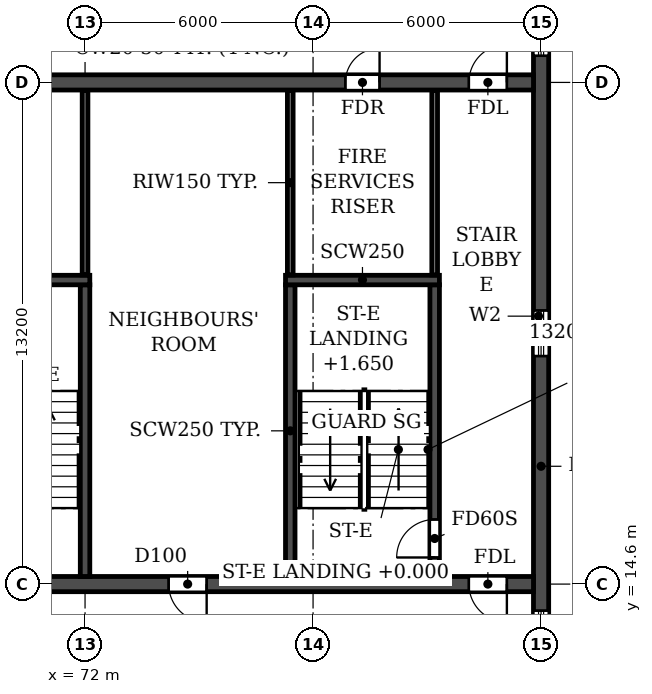
"""IFC4 building model, lengths in metres.
Left out: names, types, materials, properties, quantities, classifications, styles, units other than length and angle.
Written with IfcOpenShell. Run it as: python <this file> out.ifc"""

import sys

from ifc_helpers import new_model, si_unit, direction, frame, frame_2d, origin, place, context, subcontext, project, spatial, rectangle, extrude, element, fill, save


model = new_model("IFC4")
c1 = context("Model", 3, precision=1e-05, world=origin(), true_north=direction((0.0, 1.0)))
c2 = subcontext(c1, "Body", "Model", "MODEL_VIEW")
j1 = project(units=[si_unit("LENGTHUNIT", "METRE"), si_unit("PLANEANGLEUNIT", "RADIAN")], contexts=[c1])
p1 = place(None, origin())
s1 = spatial("IfcSite", under=j1, at=p1, CompositionType="ELEMENT")
p2 = place(p1, origin())
s2 = spatial("IfcBuilding", under=s1, at=p2, CompositionType="ELEMENT")
p3 = place(p2, frame((0.0, 0.0, 208.2)))
s3 = spatial("IfcBuildingStorey", under=s2, at=p3, CompositionType="ELEMENT", Elevation=208.2)
p4 = place(p3, frame((84.0, 4.683, 0.0), z_axis=(0.0, 0.0, 1.0), x_axis=(0.0, 1.0, 0.0)))
e1 = element("IfcWall", 1, at=p4, inside=s3, PredefinedType="SHEAR", context=c2, shape_type="SweptSolid", body=[
    extrude(rectangle(XDim=31.834, YDim=0.4, at=frame_2d((15.917, 0.0))), origin(), (0.0, 0.0, 1.0), 3.0),
])
p5 = place(p4, frame((23.817, 0.0, 0.9)))
e2 = element("IfcOpeningElement", 2, at=p5, cuts=e1, PredefinedType="OPENING", context=c2, shape_type="SweptSolid", body=[
    extrude(rectangle(XDim=1.2, YDim=1.5, at=frame_2d((0.6, 0.75))), frame((0.0, 0.21, 0.0), z_axis=(0.0, -1.0, 0.0), x_axis=(1.0, 0.0, 0.0)), (0.0, 0.0, 1.0), 0.42),
])
p6 = place(p4, frame((8.017, 0.0, 0.9)))
e3 = element("IfcOpeningElement", 3, at=p6, cuts=e1, PredefinedType="OPENING", context=c2, shape_type="SweptSolid", body=[
    extrude(rectangle(XDim=1.2, YDim=1.5, at=frame_2d((0.6, 0.75))), frame((0.0, 0.21, 0.0), z_axis=(0.0, -1.0, 0.0), x_axis=(1.0, 0.0, 0.0)), (0.0, 0.0, 1.0), 0.42),
])
p7 = place(p4, frame((27.694, 0.0, 0.6)))
e4 = element("IfcOpeningElement", 4, at=p7, cuts=e1, PredefinedType="OPENING", context=c2, shape_type="SweptSolid", body=[
    extrude(rectangle(XDim=2.2, YDim=1.8, at=frame_2d((1.1, 0.9))), frame((0.0, 0.21, 0.0), z_axis=(0.0, -1.0, 0.0), x_axis=(1.0, 0.0, 0.0)), (0.0, 0.0, 1.0), 0.42),
])
p8 = place(p4, frame((2.541, 0.0, 0.6)))
e5 = element("IfcOpeningElement", 5, at=p8, cuts=e1, PredefinedType="OPENING", context=c2, shape_type="SweptSolid", body=[
    extrude(rectangle(XDim=2.2, YDim=1.8, at=frame_2d((1.1, 0.9))), frame((0.0, 0.21, 0.0), z_axis=(0.0, -1.0, 0.0), x_axis=(1.0, 0.0, 0.0)), (0.0, 0.0, 1.0), 0.42),
])
p9 = place(p4, frame((15.917, 0.0, 0.9)))
e6 = element("IfcOpeningElement", 6, at=p9, cuts=e1, PredefinedType="OPENING", context=c2, shape_type="SweptSolid", body=[
    extrude(rectangle(XDim=1.2, YDim=1.5, at=frame_2d((0.6, 0.75))), frame((0.0, 0.21, 0.0), z_axis=(0.0, -1.0, 0.0), x_axis=(1.0, 0.0, 0.0)), (0.0, 0.0, 1.0), 0.42),
])
p10 = place(p3, frame((18.2, 14.6, 0.0), z_axis=(0.0, 0.0, 1.0), x_axis=(1.0, 0.0, 0.0)))
e7 = element("IfcWall", 7, at=p10, inside=s3, PredefinedType="SOLIDWALL", context=c2, shape_type="SweptSolid", body=[
    extrude(rectangle(XDim=65.6, YDim=0.4, at=frame_2d((32.8, 0.0))), origin(), (0.0, 0.0, 1.0), 3.0),
])
p11 = place(p10, frame((0.7, 0.0, 0.0)))
e8 = element("IfcOpeningElement", 8, at=p11, cuts=e7, PredefinedType="OPENING", context=c2, shape_type="SweptSolid", body=[
    extrude(rectangle(XDim=1.0, YDim=2.1, at=frame_2d((0.5, 1.05))), frame((0.0, 0.21, 0.0), z_axis=(0.0, -1.0, 0.0), x_axis=(1.0, 0.0, 0.0)), (0.0, 0.0, 1.0), 0.42),
])
p12 = place(p10, frame((8.6, 0.0, 0.0)))
e9 = element("IfcOpeningElement", 9, at=p12, cuts=e7, PredefinedType="OPENING", context=c2, shape_type="SweptSolid", body=[
    extrude(rectangle(XDim=1.0, YDim=2.1, at=frame_2d((0.5, 1.05))), frame((0.0, 0.21, 0.0), z_axis=(0.0, -1.0, 0.0), x_axis=(1.0, 0.0, 0.0)), (0.0, 0.0, 1.0), 0.42),
])
p13 = place(p10, frame((13.2, 0.0, 0.0)))
e10 = element("IfcOpeningElement", 10, at=p13, cuts=e7, PredefinedType="OPENING", context=c2, shape_type="SweptSolid", body=[
    extrude(rectangle(XDim=1.0, YDim=2.1, at=frame_2d((0.5, 1.05))), frame((0.0, 0.21, 0.0), z_axis=(0.0, -1.0, 0.0), x_axis=(1.0, 0.0, 0.0)), (0.0, 0.0, 1.0), 0.42),
])
p14 = place(p10, frame((27.1, 0.0, 0.0)))
e11 = element("IfcOpeningElement", 11, at=p14, cuts=e7, PredefinedType="OPENING", context=c2, shape_type="SweptSolid", body=[
    extrude(rectangle(XDim=1.0, YDim=2.1, at=frame_2d((0.5, 1.05))), frame((0.0, 0.21, 0.0), z_axis=(0.0, -1.0, 0.0), x_axis=(1.0, 0.0, 0.0)), (0.0, 0.0, 1.0), 0.42),
])
p15 = place(p10, frame((32.3, 0.0, 0.0)))
e12 = element("IfcOpeningElement", 12, at=p15, cuts=e7, PredefinedType="OPENING", context=c2, shape_type="SweptSolid", body=[
    extrude(rectangle(XDim=1.0, YDim=2.1, at=frame_2d((0.5, 1.05))), frame((0.0, 0.21, 0.0), z_axis=(0.0, -1.0, 0.0), x_axis=(1.0, 0.0, 0.0)), (0.0, 0.0, 1.0), 0.42),
])
p16 = place(p10, frame((34.9, 0.0, 0.0)))
e13 = element("IfcOpeningElement", 13, at=p16, cuts=e7, PredefinedType="OPENING", context=c2, shape_type="SweptSolid", body=[
    extrude(rectangle(XDim=1.0, YDim=2.1, at=frame_2d((0.5, 1.05))), frame((0.0, 0.21, 0.0), z_axis=(0.0, -1.0, 0.0), x_axis=(1.0, 0.0, 0.0)), (0.0, 0.0, 1.0), 0.42),
])
p17 = place(p10, frame((38.8, 0.0, 0.0)))
e14 = element("IfcOpeningElement", 14, at=p17, cuts=e7, PredefinedType="OPENING", context=c2, shape_type="SweptSolid", body=[
    extrude(rectangle(XDim=1.0, YDim=2.1, at=frame_2d((0.5, 1.05))), frame((0.0, 0.21, 0.0), z_axis=(0.0, -1.0, 0.0), x_axis=(1.0, 0.0, 0.0)), (0.0, 0.0, 1.0), 0.42),
])
p18 = place(p10, frame((51.4, 0.0, 0.0)))
e15 = element("IfcOpeningElement", 15, at=p18, cuts=e7, PredefinedType="OPENING", context=c2, shape_type="SweptSolid", body=[
    extrude(rectangle(XDim=1.0, YDim=2.1, at=frame_2d((0.5, 1.05))), frame((0.0, 0.21, 0.0), z_axis=(0.0, -1.0, 0.0), x_axis=(1.0, 0.0, 0.0)), (0.0, 0.0, 1.0), 0.42),
])
p19 = place(p10, frame((56.0, 0.0, 0.0)))
e16 = element("IfcOpeningElement", 16, at=p19, cuts=e7, PredefinedType="OPENING", context=c2, shape_type="SweptSolid", body=[
    extrude(rectangle(XDim=1.0, YDim=2.1, at=frame_2d((0.5, 1.05))), frame((0.0, 0.21, 0.0), z_axis=(0.0, -1.0, 0.0), x_axis=(1.0, 0.0, 0.0)), (0.0, 0.0, 1.0), 0.42),
])
p20 = place(p10, frame((63.9, 0.0, 0.0)))
e17 = element("IfcOpeningElement", 17, at=p20, cuts=e7, PredefinedType="OPENING", context=c2, shape_type="SweptSolid", body=[
    extrude(rectangle(XDim=1.0, YDim=2.1, at=frame_2d((0.5, 1.05))), frame((0.0, 0.21, 0.0), z_axis=(0.0, -1.0, 0.0), x_axis=(1.0, 0.0, 0.0)), (0.0, 0.0, 1.0), 0.42),
])
p21 = place(p3, frame((18.2, 27.8, 0.0), z_axis=(0.0, 0.0, 1.0), x_axis=(1.0, 0.0, 0.0)))
e18 = element("IfcWall", 18, at=p21, inside=s3, PredefinedType="SOLIDWALL", context=c2, shape_type="SweptSolid", body=[
    extrude(rectangle(XDim=65.6, YDim=0.4, at=frame_2d((32.8, 0.0))), origin(), (0.0, 0.0, 1.0), 3.0),
])
p22 = place(p21, frame((0.7, 0.0, 0.0)))
e19 = element("IfcOpeningElement", 19, at=p22, cuts=e18, PredefinedType="OPENING", context=c2, shape_type="SweptSolid", body=[
    extrude(rectangle(XDim=1.0, YDim=2.1, at=frame_2d((0.5, 1.05))), frame((0.0, 0.21, 0.0), z_axis=(0.0, -1.0, 0.0), x_axis=(1.0, 0.0, 0.0)), (0.0, 0.0, 1.0), 0.42),
])
p23 = place(p21, frame((4.05, 0.0, 0.0)))
e20 = element("IfcOpeningElement", 20, at=p23, cuts=e18, PredefinedType="OPENING", context=c2, shape_type="SweptSolid", body=[
    extrude(rectangle(XDim=0.9, YDim=2.1, at=frame_2d((0.45, 1.05))), frame((0.0, 0.21, 0.0), z_axis=(0.0, -1.0, 0.0), x_axis=(1.0, 0.0, 0.0)), (0.0, 0.0, 1.0), 0.42),
])
p24 = place(p21, frame((13.25, 0.0, 0.0)))
e21 = element("IfcOpeningElement", 21, at=p24, cuts=e18, PredefinedType="OPENING", context=c2, shape_type="SweptSolid", body=[
    extrude(rectangle(XDim=0.9, YDim=2.1, at=frame_2d((0.45, 1.05))), frame((0.0, 0.21, 0.0), z_axis=(0.0, -1.0, 0.0), x_axis=(1.0, 0.0, 0.0)), (0.0, 0.0, 1.0), 0.42),
])
p25 = place(p21, frame((17.7, 0.0, 0.0)))
e22 = element("IfcOpeningElement", 22, at=p25, cuts=e18, PredefinedType="OPENING", context=c2, shape_type="SweptSolid", body=[
    extrude(rectangle(XDim=1.0, YDim=2.1, at=frame_2d((0.5, 1.05))), frame((0.0, 0.21, 0.0), z_axis=(0.0, -1.0, 0.0), x_axis=(1.0, 0.0, 0.0)), (0.0, 0.0, 1.0), 0.42),
])
p26 = place(p21, frame((22.9, 0.0, 0.0)))
e23 = element("IfcOpeningElement", 23, at=p26, cuts=e18, PredefinedType="OPENING", context=c2, shape_type="SweptSolid", body=[
    extrude(rectangle(XDim=1.0, YDim=2.1, at=frame_2d((0.5, 1.05))), frame((0.0, 0.21, 0.0), z_axis=(0.0, -1.0, 0.0), x_axis=(1.0, 0.0, 0.0)), (0.0, 0.0, 1.0), 0.42),
])
p27 = place(p21, frame((29.4, 0.0, 0.0)))
e24 = element("IfcOpeningElement", 24, at=p27, cuts=e18, PredefinedType="OPENING", context=c2, shape_type="SweptSolid", body=[
    extrude(rectangle(XDim=1.0, YDim=2.1, at=frame_2d((0.5, 1.05))), frame((0.0, 0.21, 0.0), z_axis=(0.0, -1.0, 0.0), x_axis=(1.0, 0.0, 0.0)), (0.0, 0.0, 1.0), 0.42),
])
p28 = place(p21, frame((32.3, 0.0, 0.0)))
e25 = element("IfcOpeningElement", 25, at=p28, cuts=e18, PredefinedType="OPENING", context=c2, shape_type="SweptSolid", body=[
    extrude(rectangle(XDim=1.0, YDim=2.1, at=frame_2d((0.5, 1.05))), frame((0.0, 0.21, 0.0), z_axis=(0.0, -1.0, 0.0), x_axis=(1.0, 0.0, 0.0)), (0.0, 0.0, 1.0), 0.42),
])
p29 = place(p21, frame((35.2, 0.0, 0.0)))
e26 = element("IfcOpeningElement", 26, at=p29, cuts=e18, PredefinedType="OPENING", context=c2, shape_type="SweptSolid", body=[
    extrude(rectangle(XDim=1.0, YDim=2.1, at=frame_2d((0.5, 1.05))), frame((0.0, 0.21, 0.0), z_axis=(0.0, -1.0, 0.0), x_axis=(1.0, 0.0, 0.0)), (0.0, 0.0, 1.0), 0.42),
])
p30 = place(p21, frame((37.8, 0.0, 0.0)))
e27 = element("IfcOpeningElement", 27, at=p30, cuts=e18, PredefinedType="OPENING", context=c2, shape_type="SweptSolid", body=[
    extrude(rectangle(XDim=1.0, YDim=2.1, at=frame_2d((0.5, 1.05))), frame((0.0, 0.21, 0.0), z_axis=(0.0, -1.0, 0.0), x_axis=(1.0, 0.0, 0.0)), (0.0, 0.0, 1.0), 0.42),
])
p31 = place(p21, frame((40.4, 0.0, 0.0)))
e28 = element("IfcOpeningElement", 28, at=p31, cuts=e18, PredefinedType="OPENING", context=c2, shape_type="SweptSolid", body=[
    extrude(rectangle(XDim=1.0, YDim=2.1, at=frame_2d((0.5, 1.05))), frame((0.0, 0.21, 0.0), z_axis=(0.0, -1.0, 0.0), x_axis=(1.0, 0.0, 0.0)), (0.0, 0.0, 1.0), 0.42),
])
p32 = place(p21, frame((43.0, 0.0, 0.0)))
e29 = element("IfcOpeningElement", 29, at=p32, cuts=e18, PredefinedType="OPENING", context=c2, shape_type="SweptSolid", body=[
    extrude(rectangle(XDim=1.0, YDim=2.1, at=frame_2d((0.5, 1.05))), frame((0.0, 0.21, 0.0), z_axis=(0.0, -1.0, 0.0), x_axis=(1.0, 0.0, 0.0)), (0.0, 0.0, 1.0), 0.42),
])
p33 = place(p21, frame((46.9, 0.0, 0.0)))
e30 = element("IfcOpeningElement", 30, at=p33, cuts=e18, PredefinedType="OPENING", context=c2, shape_type="SweptSolid", body=[
    extrude(rectangle(XDim=1.0, YDim=2.1, at=frame_2d((0.5, 1.05))), frame((0.0, 0.21, 0.0), z_axis=(0.0, -1.0, 0.0), x_axis=(1.0, 0.0, 0.0)), (0.0, 0.0, 1.0), 0.42),
])
p34 = place(p21, frame((51.45, 0.0, 0.0)))
e31 = element("IfcOpeningElement", 31, at=p34, cuts=e18, PredefinedType="OPENING", context=c2, shape_type="SweptSolid", body=[
    extrude(rectangle(XDim=0.9, YDim=2.1, at=frame_2d((0.45, 1.05))), frame((0.0, 0.21, 0.0), z_axis=(0.0, -1.0, 0.0), x_axis=(1.0, 0.0, 0.0)), (0.0, 0.0, 1.0), 0.42),
])
p35 = place(p21, frame((60.65, 0.0, 0.0)))
e32 = element("IfcOpeningElement", 32, at=p35, cuts=e18, PredefinedType="OPENING", context=c2, shape_type="SweptSolid", body=[
    extrude(rectangle(XDim=0.9, YDim=2.1, at=frame_2d((0.45, 1.05))), frame((0.0, 0.21, 0.0), z_axis=(0.0, -1.0, 0.0), x_axis=(1.0, 0.0, 0.0)), (0.0, 0.0, 1.0), 0.42),
])
p36 = place(p21, frame((63.9, 0.0, 0.0)))
e33 = element("IfcOpeningElement", 33, at=p36, cuts=e18, PredefinedType="OPENING", context=c2, shape_type="SweptSolid", body=[
    extrude(rectangle(XDim=1.0, YDim=2.1, at=frame_2d((0.5, 1.05))), frame((0.0, 0.21, 0.0), z_axis=(0.0, -1.0, 0.0), x_axis=(1.0, 0.0, 0.0)), (0.0, 0.0, 1.0), 0.42),
])
p37 = place(p3, frame((72.0, 14.8, 0.0), z_axis=(0.0, 0.0, 1.0), x_axis=(0.0, 1.0, 0.0)))
e34 = element("IfcWall", 34, at=p37, inside=s3, PredefinedType="SOLIDWALL", context=c2, shape_type="SweptSolid", body=[
    extrude(rectangle(XDim=7.675, YDim=0.25, at=frame_2d((3.837, 0.0))), origin(), (0.0, 0.0, 1.0), 3.0),
])
p38 = place(p3, frame((68.075, 22.6, 0.0), z_axis=(0.0, 0.0, 1.0), x_axis=(1.0, 0.0, 0.0)))
e35 = element("IfcWall", 35, at=p38, inside=s3, PredefinedType="SOLIDWALL", context=c2, shape_type="SweptSolid", body=[
    extrude(rectangle(XDim=4.05, YDim=0.25, at=frame_2d((2.025, 0.0))), origin(), (0.0, 0.0, 1.0), 3.0),
])
p39 = place(p3, frame((77.4, 14.8, 0.0), z_axis=(0.0, 0.0, 1.0), x_axis=(0.0, 1.0, 0.0)))
e36 = element("IfcWall", 36, at=p39, inside=s3, PredefinedType="SOLIDWALL", context=c2, shape_type="SweptSolid", body=[
    extrude(rectangle(XDim=7.675, YDim=0.25, at=frame_2d((3.837, 0.0))), origin(), (0.0, 0.0, 1.0), 3.0),
])
p40 = place(p3, frame((81.2, 14.8, 0.0), z_axis=(0.0, 0.0, 1.0), x_axis=(0.0, 1.0, 0.0)))
e37 = element("IfcWall", 37, at=p40, inside=s3, PredefinedType="SOLIDWALL", context=c2, shape_type="SweptSolid", body=[
    extrude(rectangle(XDim=7.675, YDim=0.25, at=frame_2d((3.837, 0.0))), origin(), (0.0, 0.0, 1.0), 3.0),
])
p41 = place(p40, frame((0.5, 0.0, 0.0)))
e38 = element("IfcOpeningElement", 38, at=p41, cuts=e37, PredefinedType="OPENING", context=c2, shape_type="SweptSolid", body=[
    extrude(rectangle(XDim=1.0, YDim=2.1, at=frame_2d((0.5, 1.05))), frame((0.0, 0.135, 0.0), z_axis=(0.0, -1.0, 0.0), x_axis=(1.0, 0.0, 0.0)), (0.0, 0.0, 1.0), 0.27),
])
p42 = place(p3, frame((77.275, 22.6, 0.0), z_axis=(0.0, 0.0, 1.0), x_axis=(1.0, 0.0, 0.0)))
e39 = element("IfcWall", 39, at=p42, inside=s3, PredefinedType="SOLIDWALL", context=c2, shape_type="SweptSolid", body=[
    extrude(rectangle(XDim=4.05, YDim=0.25, at=frame_2d((2.025, 0.0))), origin(), (0.0, 0.0, 1.0), 3.0),
])
for number, where, z_axis, x_axis in (
    (40, (72.0, 22.735, 0.0), (0.0, 0.0, 1.0), (0.0, 1.0, 0.0)),
    (41, (77.4, 22.735, 0.0), (0.0, 0.0, 1.0), (0.0, 1.0, 0.0)),
    (42, (81.2, 22.735, 0.0), (0.0, 0.0, 1.0), (0.0, 1.0, 0.0)),
):
    element("IfcWall", number, at=place(p3, frame(where, z_axis=z_axis, x_axis=x_axis)), inside=s3, PredefinedType="PARTITIONING", context=c2, shape_type="SweptSolid", body=[
        extrude(rectangle(XDim=4.855, YDim=0.15, at=frame_2d((2.427, 0.0))), origin(), (0.0, 0.0, 1.0), 3.0),
    ])
p43 = place(p5, origin())
e43 = element("IfcWindow", 43, at=p43, inside=s3, PartitioningType="SINGLE_PANEL", PredefinedType="WINDOW", context=c2, shape_type="SweptSolid", body=[
    extrude(rectangle(XDim=1.2, YDim=1.5, at=frame_2d((0.6, 0.75))), frame((0.0, 0.03, 0.0), z_axis=(0.0, -1.0, 0.0), x_axis=(1.0, 0.0, 0.0)), (0.0, 0.0, 1.0), 0.06),
])
fill(e2, e43)
p44 = place(p6, origin())
e44 = element("IfcWindow", 44, at=p44, inside=s3, PartitioningType="SINGLE_PANEL", PredefinedType="WINDOW", context=c2, shape_type="SweptSolid", body=[
    extrude(rectangle(XDim=1.2, YDim=1.5, at=frame_2d((0.6, 0.75))), frame((0.0, 0.03, 0.0), z_axis=(0.0, -1.0, 0.0), x_axis=(1.0, 0.0, 0.0)), (0.0, 0.0, 1.0), 0.06),
])
fill(e3, e44)
p45 = place(p9, origin())
e45 = element("IfcWindow", 45, at=p45, inside=s3, PartitioningType="SINGLE_PANEL", PredefinedType="WINDOW", context=c2, shape_type="SweptSolid", body=[
    extrude(rectangle(XDim=1.2, YDim=1.5, at=frame_2d((0.6, 0.75))), frame((0.0, 0.03, 0.0), z_axis=(0.0, -1.0, 0.0), x_axis=(1.0, 0.0, 0.0)), (0.0, 0.0, 1.0), 0.06),
])
fill(e6, e45)
p46 = place(p35, origin())
e46 = element("IfcDoor", 46, at=p46, inside=s3, OperationType="SINGLE_SWING_RIGHT", PredefinedType="DOOR", context=c2, shape_type="SweptSolid", body=[
    extrude(rectangle(XDim=0.9, YDim=2.1, at=frame_2d((0.45, 1.05))), frame((0.0, 0.025, 0.0), z_axis=(0.0, -1.0, 0.0), x_axis=(1.0, 0.0, 0.0)), (0.0, 0.0, 1.0), 0.05),
])
fill(e32, e46)
p47 = place(p36, origin())
e47 = element("IfcDoor", 47, at=p47, inside=s3, OperationType="SINGLE_SWING_RIGHT", PredefinedType="DOOR", context=c2, shape_type="SweptSolid", body=[
    extrude(rectangle(XDim=1.0, YDim=2.1, at=frame_2d((0.5, 1.05))), frame((0.0, 0.025, 0.0), z_axis=(0.0, -1.0, 0.0), x_axis=(1.0, 0.0, 0.0)), (0.0, 0.0, 1.0), 0.05),
])
fill(e33, e47)
p48 = place(p19, frame((1.0, 0.0, 0.0), z_axis=(0.0, 0.0, 1.0), x_axis=(-1.0, 0.0, 0.0)))
e48 = element("IfcDoor", 48, at=p48, inside=s3, OperationType="SINGLE_SWING_LEFT", PredefinedType="DOOR", context=c2, shape_type="SweptSolid", body=[
    extrude(rectangle(XDim=1.0, YDim=2.1, at=frame_2d((0.5, 1.05))), frame((0.0, 0.025, 0.0), z_axis=(0.0, -1.0, 0.0), x_axis=(1.0, 0.0, 0.0)), (0.0, 0.0, 1.0), 0.05),
])
fill(e16, e48)
p49 = place(p20, frame((1.0, 0.0, 0.0), z_axis=(0.0, 0.0, 1.0), x_axis=(-1.0, 0.0, 0.0)))
e49 = element("IfcDoor", 49, at=p49, inside=s3, OperationType="SINGLE_SWING_LEFT", PredefinedType="DOOR", context=c2, shape_type="SweptSolid", body=[
    extrude(rectangle(XDim=1.0, YDim=2.1, at=frame_2d((0.5, 1.05))), frame((0.0, 0.025, 0.0), z_axis=(0.0, -1.0, 0.0), x_axis=(1.0, 0.0, 0.0)), (0.0, 0.0, 1.0), 0.05),
])
fill(e17, e49)
p50 = place(p41, origin())
e50 = element("IfcDoor", 50, at=p50, inside=s3, OperationType="SINGLE_SWING_LEFT", PredefinedType="DOOR", context=c2, shape_type="SweptSolid", body=[
    extrude(rectangle(XDim=1.0, YDim=2.1, at=frame_2d((0.5, 1.05))), frame((0.0, 0.025, 0.0), z_axis=(0.0, -1.0, 0.0), x_axis=(1.0, 0.0, 0.0)), (0.0, 0.0, 1.0), 0.05),
])
fill(e38, e50)
save(model, sys.argv[1])
